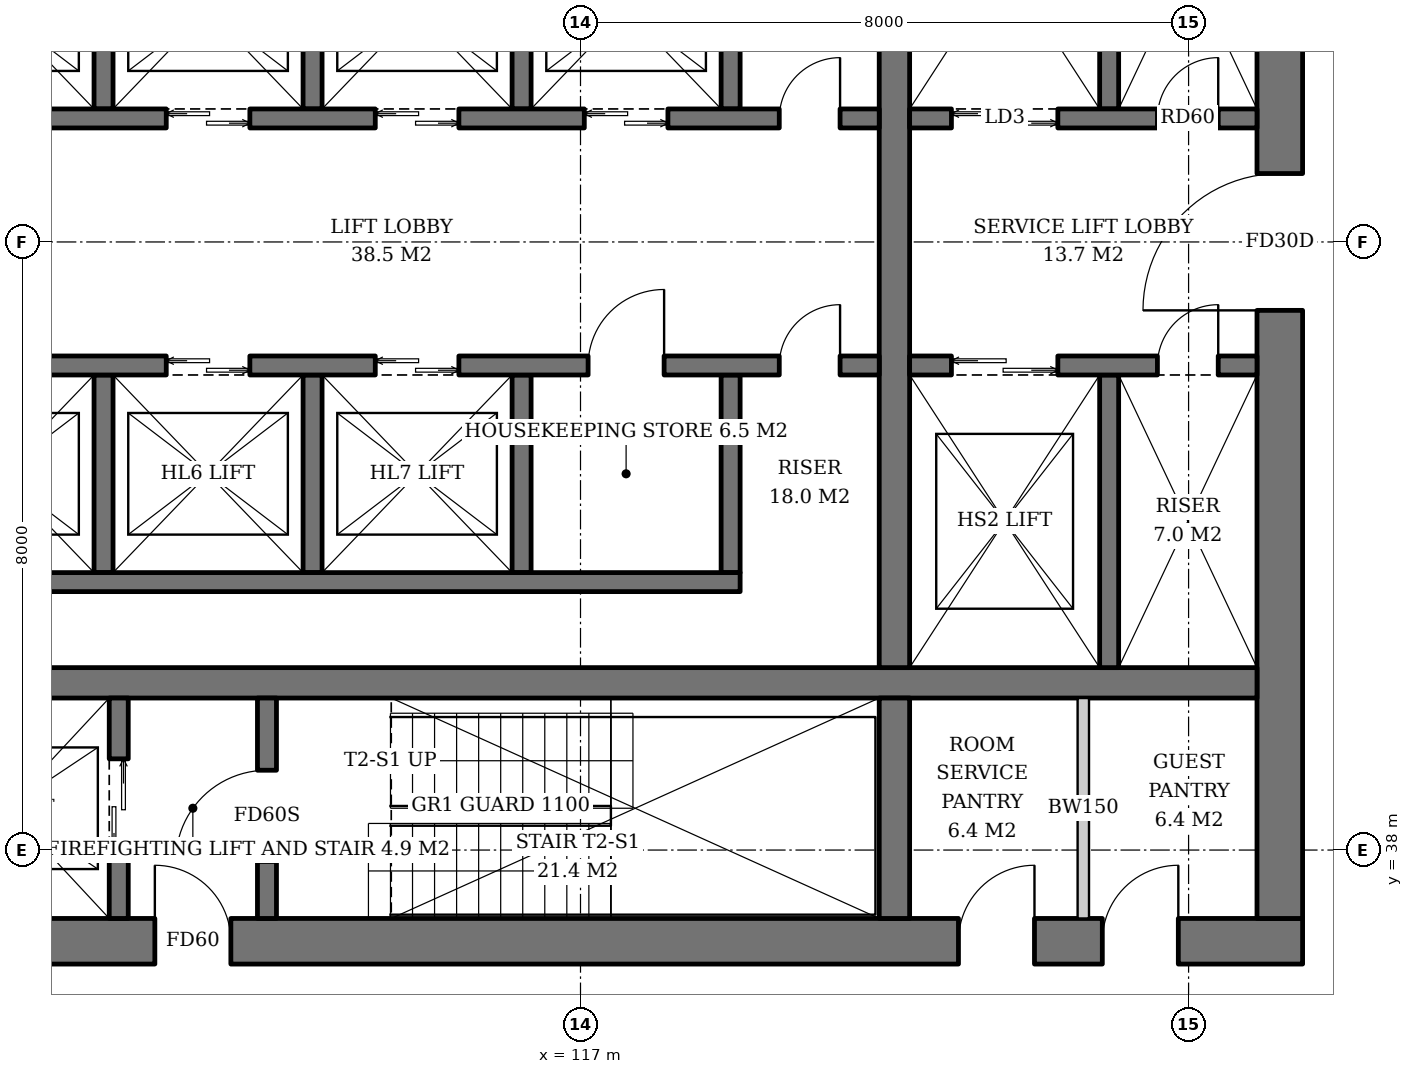
"""IFC4 building model, lengths in metres.
Left out: names, types, materials, properties, quantities, classifications, styles, units other than length and angle.
Written with IfcOpenShell. Run it as: python <this file> out.ifc"""

import sys

from ifc_helpers import new_model, si_unit, direction, frame, frame_2d, origin, place, context, subcontext, project, spatial, rectangle, extrude, element, fill, save


model = new_model("IFC4")
c1 = context("Model", 3, precision=1e-05, world=origin(), true_north=direction((0.0, 1.0)))
c2 = subcontext(c1, "Body", "Model", "MODEL_VIEW")
j1 = project(units=[si_unit("LENGTHUNIT", "METRE"), si_unit("PLANEANGLEUNIT", "RADIAN")], contexts=[c1])
p1 = place(None, origin())
s1 = spatial("IfcSite", under=j1, at=p1, CompositionType="ELEMENT")
p2 = place(p1, origin())
s2 = spatial("IfcBuilding", under=s1, at=p2, CompositionType="ELEMENT")
p3 = place(p2, frame((0.0, 0.0, 89.4)))
s3 = spatial("IfcBuildingStorey", under=s2, at=p3, CompositionType="ELEMENT", Elevation=89.4)
p4 = place(p3, frame((107.5, 36.8, 0.0), z_axis=(0.0, 0.0, 1.0), x_axis=(1.0, 0.0, 0.0)))
e1 = element("IfcWall", 1, at=p4, inside=s3, PredefinedType="SHEAR", context=c2, shape_type="SweptSolid", body=[
    extrude(rectangle(XDim=19.0, YDim=0.6, at=frame_2d((9.5, 0.0))), origin(), (0.0, 0.0, 1.0), 3.8),
])
p5 = place(p4, frame((3.9, 0.0, 0.0)))
e2 = element("IfcOpeningElement", 2, at=p5, cuts=e1, PredefinedType="OPENING", context=c2, shape_type="SweptSolid", body=[
    extrude(rectangle(XDim=1.0, YDim=2.1, at=frame_2d((0.5, 1.05))), frame((0.0, 0.31, 0.0), z_axis=(0.0, -1.0, 0.0), x_axis=(1.0, 0.0, 0.0)), (0.0, 0.0, 1.0), 0.62),
])
p6 = place(p4, frame((14.472, 0.0, 0.0)))
e3 = element("IfcOpeningElement", 3, at=p6, cuts=e1, PredefinedType="OPENING", context=c2, shape_type="SweptSolid", body=[
    extrude(rectangle(XDim=1.0, YDim=2.1, at=frame_2d((0.5, 1.05))), frame((0.0, 0.31, 0.0), z_axis=(0.0, -1.0, 0.0), x_axis=(1.0, 0.0, 0.0)), (0.0, 0.0, 1.0), 0.62),
])
p7 = place(p4, frame((16.365, 0.0, 0.0)))
e4 = element("IfcOpeningElement", 4, at=p7, cuts=e1, PredefinedType="OPENING", context=c2, shape_type="SweptSolid", body=[
    extrude(rectangle(XDim=1.0, YDim=2.1, at=frame_2d((0.5, 1.05))), frame((0.0, 0.31, 0.0), z_axis=(0.0, -1.0, 0.0), x_axis=(1.0, 0.0, 0.0)), (0.0, 0.0, 1.0), 0.62),
])
p8 = place(p3, frame((126.2, 37.1, 0.0), z_axis=(0.0, 0.0, 1.0), x_axis=(0.0, 1.0, 0.0)))
e5 = element("IfcWall", 5, at=p8, inside=s3, PredefinedType="SHEAR", context=c2, shape_type="SweptSolid", body=[
    extrude(rectangle(XDim=17.8, YDim=0.6, at=frame_2d((8.9, 0.0))), origin(), (0.0, 0.0, 1.0), 3.8),
])
p9 = place(p8, frame((8.0, 0.0, 0.0)))
e6 = element("IfcOpeningElement", 6, at=p9, cuts=e5, PredefinedType="OPENING", context=c2, shape_type="SweptSolid", body=[
    extrude(rectangle(XDim=1.8, YDim=2.4, at=frame_2d((0.9, 1.2))), frame((0.0, 0.31, 0.0), z_axis=(0.0, -1.0, 0.0), x_axis=(1.0, 0.0, 0.0)), (0.0, 0.0, 1.0), 0.62),
])
p10 = place(p3, frame((108.1, 40.2, 0.0), z_axis=(0.0, 0.0, 1.0), x_axis=(1.0, 0.0, 0.0)))
e7 = element("IfcWall", 7, at=p10, inside=s3, PredefinedType="SHEAR", context=c2, shape_type="SweptSolid", body=[
    extrude(rectangle(XDim=17.8, YDim=0.4, at=frame_2d((8.9, 0.0))), origin(), (0.0, 0.0, 1.0), 3.8),
])
p11 = place(p3, frame((121.13, 37.1, 0.0), z_axis=(0.0, 0.0, 1.0), x_axis=(0.0, 1.0, 0.0)))
e8 = element("IfcWall", 8, at=p11, inside=s3, PredefinedType="SHEAR", context=c2, shape_type="SweptSolid", body=[
    extrude(rectangle(XDim=2.9, YDim=0.4, at=frame_2d((1.45, 0.0))), origin(), (0.0, 0.0, 1.0), 3.8),
])
p12 = place(p3, frame((121.13, 40.4, 0.0), z_axis=(0.0, 0.0, 1.0), x_axis=(0.0, 1.0, 0.0)))
e9 = element("IfcWall", 9, at=p12, inside=s3, PredefinedType="SHEAR", context=c2, shape_type="SweptSolid", body=[
    extrude(rectangle(XDim=11.2, YDim=0.4, at=frame_2d((5.6, 0.0))), origin(), (0.0, 0.0, 1.0), 3.8),
])
p13 = place(p3, frame((110.925, 37.1, 0.0), z_axis=(0.0, 0.0, 1.0), x_axis=(0.0, 1.0, 0.0)))
e10 = element("IfcWall", 10, at=p13, inside=s3, PredefinedType="SHEAR", context=c2, shape_type="SweptSolid", body=[
    extrude(rectangle(XDim=2.9, YDim=0.25, at=frame_2d((1.45, 0.0))), origin(), (0.0, 0.0, 1.0), 3.8),
])
p14 = place(p13, frame((0.8, 0.0, 0.0)))
e11 = element("IfcOpeningElement", 11, at=p14, cuts=e10, PredefinedType="OPENING", context=c2, shape_type="SweptSolid", body=[
    extrude(rectangle(XDim=1.3, YDim=2.2, at=frame_2d((0.65, 1.1))), frame((0.0, 0.135, 0.0), z_axis=(0.0, -1.0, 0.0), x_axis=(1.0, 0.0, 0.0)), (0.0, 0.0, 1.0), 0.27),
])
p15 = place(p3, frame((112.875, 37.1, 0.0), z_axis=(0.0, 0.0, 1.0), x_axis=(0.0, 1.0, 0.0)))
e12 = element("IfcWall", 12, at=p15, inside=s3, PredefinedType="SHEAR", context=c2, shape_type="SweptSolid", body=[
    extrude(rectangle(XDim=2.9, YDim=0.25, at=frame_2d((1.45, 0.0))), origin(), (0.0, 0.0, 1.0), 3.8),
])
p16 = place(p15, frame((0.75, 0.0, 0.0)))
e13 = element("IfcOpeningElement", 13, at=p16, cuts=e12, PredefinedType="OPENING", context=c2, shape_type="SweptSolid", body=[
    extrude(rectangle(XDim=1.2, YDim=2.1, at=frame_2d((0.6, 1.05))), frame((0.0, 0.135, 0.0), z_axis=(0.0, -1.0, 0.0), x_axis=(1.0, 0.0, 0.0)), (0.0, 0.0, 1.0), 0.27),
])
for number, where, z_axis, x_axis in (
    (14, (110.725, 47.75, 0.0), (0.0, 0.0, 1.0), (0.0, 1.0, 0.0)),
    (15, (113.475, 47.75, 0.0), (0.0, 0.0, 1.0), (0.0, 1.0, 0.0)),
    (16, (116.225, 47.75, 0.0), (0.0, 0.0, 1.0), (0.0, 1.0, 0.0)),
    (17, (118.975, 47.75, 0.0), (0.0, 0.0, 1.0), (0.0, 1.0, 0.0)),
):
    element("IfcWall", number, at=place(p3, frame(where, z_axis=z_axis, x_axis=x_axis)), inside=s3, PredefinedType="SHEAR", context=c2, shape_type="SweptSolid", body=[
        extrude(rectangle(XDim=2.6, YDim=0.25, at=frame_2d((1.3, 0.0))), origin(), (0.0, 0.0, 1.0), 3.8),
    ])
p17 = place(p3, frame((108.1, 47.625, 0.0), z_axis=(0.0, 0.0, 1.0), x_axis=(1.0, 0.0, 0.0)))
e18 = element("IfcWall", 18, at=p17, inside=s3, PredefinedType="SHEAR", context=c2, shape_type="SweptSolid", body=[
    extrude(rectangle(XDim=12.83, YDim=0.25, at=frame_2d((6.415, 0.0))), origin(), (0.0, 0.0, 1.0), 3.8),
])
p18 = place(p17, frame((0.7, 0.0, 0.0)))
e19 = element("IfcOpeningElement", 19, at=p18, cuts=e18, PredefinedType="OPENING", context=c2, shape_type="SweptSolid", body=[
    extrude(rectangle(XDim=1.1, YDim=2.2, at=frame_2d((0.55, 1.1))), frame((0.0, 0.135, 0.0), z_axis=(0.0, -1.0, 0.0), x_axis=(1.0, 0.0, 0.0)), (0.0, 0.0, 1.0), 0.27),
])
p19 = place(p17, frame((3.45, 0.0, 0.0)))
e20 = element("IfcOpeningElement", 20, at=p19, cuts=e18, PredefinedType="OPENING", context=c2, shape_type="SweptSolid", body=[
    extrude(rectangle(XDim=1.1, YDim=2.2, at=frame_2d((0.55, 1.1))), frame((0.0, 0.135, 0.0), z_axis=(0.0, -1.0, 0.0), x_axis=(1.0, 0.0, 0.0)), (0.0, 0.0, 1.0), 0.27),
])
p20 = place(p17, frame((6.2, 0.0, 0.0)))
e21 = element("IfcOpeningElement", 21, at=p20, cuts=e18, PredefinedType="OPENING", context=c2, shape_type="SweptSolid", body=[
    extrude(rectangle(XDim=1.1, YDim=2.2, at=frame_2d((0.55, 1.1))), frame((0.0, 0.135, 0.0), z_axis=(0.0, -1.0, 0.0), x_axis=(1.0, 0.0, 0.0)), (0.0, 0.0, 1.0), 0.27),
])
p21 = place(p17, frame((8.95, 0.0, 0.0)))
e22 = element("IfcOpeningElement", 22, at=p21, cuts=e18, PredefinedType="OPENING", context=c2, shape_type="SweptSolid", body=[
    extrude(rectangle(XDim=1.1, YDim=2.2, at=frame_2d((0.55, 1.1))), frame((0.0, 0.135, 0.0), z_axis=(0.0, -1.0, 0.0), x_axis=(1.0, 0.0, 0.0)), (0.0, 0.0, 1.0), 0.27),
])
p22 = place(p17, frame((11.515, 0.0, 0.0)))
e23 = element("IfcOpeningElement", 23, at=p22, cuts=e18, PredefinedType="OPENING", context=c2, shape_type="SweptSolid", body=[
    extrude(rectangle(XDim=0.8, YDim=2.0, at=frame_2d((0.4, 1.0))), frame((0.0, 0.135, 0.0), z_axis=(0.0, -1.0, 0.0), x_axis=(1.0, 0.0, 0.0)), (0.0, 0.0, 1.0), 0.27),
])
for number, where, z_axis, x_axis in (
    (24, (110.725, 44.25, 0.0), (0.0, 0.0, 1.0), (0.0, -1.0, 0.0)),
    (25, (113.475, 44.25, 0.0), (0.0, 0.0, 1.0), (0.0, -1.0, 0.0)),
    (26, (116.225, 44.25, 0.0), (0.0, 0.0, 1.0), (0.0, -1.0, 0.0)),
    (27, (118.975, 44.25, 0.0), (0.0, 0.0, 1.0), (0.0, -1.0, 0.0)),
):
    element("IfcWall", number, at=place(p3, frame(where, z_axis=z_axis, x_axis=x_axis)), inside=s3, PredefinedType="SHEAR", context=c2, shape_type="SweptSolid", body=[
        extrude(rectangle(XDim=2.6, YDim=0.25, at=frame_2d((1.3, 0.0))), origin(), (0.0, 0.0, 1.0), 3.8),
    ])
p23 = place(p3, frame((108.1, 41.525, 0.0), z_axis=(0.0, 0.0, 1.0), x_axis=(1.0, 0.0, 0.0)))
e28 = element("IfcWall", 28, at=p23, inside=s3, PredefinedType="SHEAR", context=c2, shape_type="SweptSolid", body=[
    extrude(rectangle(XDim=11.0, YDim=0.25, at=frame_2d((5.5, 0.0))), origin(), (0.0, 0.0, 1.0), 3.8),
])
p24 = place(p3, frame((108.1, 44.375, 0.0), z_axis=(0.0, 0.0, 1.0), x_axis=(1.0, 0.0, 0.0)))
e29 = element("IfcWall", 29, at=p24, inside=s3, PredefinedType="SHEAR", context=c2, shape_type="SweptSolid", body=[
    extrude(rectangle(XDim=12.83, YDim=0.25, at=frame_2d((6.415, 0.0))), origin(), (0.0, 0.0, 1.0), 3.8),
])
p25 = place(p24, frame((0.7, 0.0, 0.0)))
e30 = element("IfcOpeningElement", 30, at=p25, cuts=e29, PredefinedType="OPENING", context=c2, shape_type="SweptSolid", body=[
    extrude(rectangle(XDim=1.1, YDim=2.2, at=frame_2d((0.55, 1.1))), frame((0.0, 0.135, 0.0), z_axis=(0.0, -1.0, 0.0), x_axis=(1.0, 0.0, 0.0)), (0.0, 0.0, 1.0), 0.27),
])
p26 = place(p24, frame((3.45, 0.0, 0.0)))
e31 = element("IfcOpeningElement", 31, at=p26, cuts=e29, PredefinedType="OPENING", context=c2, shape_type="SweptSolid", body=[
    extrude(rectangle(XDim=1.1, YDim=2.2, at=frame_2d((0.55, 1.1))), frame((0.0, 0.135, 0.0), z_axis=(0.0, -1.0, 0.0), x_axis=(1.0, 0.0, 0.0)), (0.0, 0.0, 1.0), 0.27),
])
p27 = place(p24, frame((6.2, 0.0, 0.0)))
e32 = element("IfcOpeningElement", 32, at=p27, cuts=e29, PredefinedType="OPENING", context=c2, shape_type="SweptSolid", body=[
    extrude(rectangle(XDim=1.1, YDim=2.2, at=frame_2d((0.55, 1.1))), frame((0.0, 0.135, 0.0), z_axis=(0.0, -1.0, 0.0), x_axis=(1.0, 0.0, 0.0)), (0.0, 0.0, 1.0), 0.27),
])
p28 = place(p24, frame((9.0, 0.0, 0.0)))
e33 = element("IfcOpeningElement", 33, at=p28, cuts=e29, PredefinedType="OPENING", context=c2, shape_type="SweptSolid", body=[
    extrude(rectangle(XDim=1.0, YDim=2.1, at=frame_2d((0.5, 1.05))), frame((0.0, 0.135, 0.0), z_axis=(0.0, -1.0, 0.0), x_axis=(1.0, 0.0, 0.0)), (0.0, 0.0, 1.0), 0.27),
])
p29 = place(p24, frame((11.515, 0.0, 0.0)))
e34 = element("IfcOpeningElement", 34, at=p29, cuts=e29, PredefinedType="OPENING", context=c2, shape_type="SweptSolid", body=[
    extrude(rectangle(XDim=0.8, YDim=2.0, at=frame_2d((0.4, 1.0))), frame((0.0, 0.135, 0.0), z_axis=(0.0, -1.0, 0.0), x_axis=(1.0, 0.0, 0.0)), (0.0, 0.0, 1.0), 0.27),
])
p30 = place(p3, frame((123.955, 47.75, 0.0), z_axis=(0.0, 0.0, 1.0), x_axis=(0.0, 1.0, 0.0)))
e35 = element("IfcWall", 35, at=p30, inside=s3, PredefinedType="SHEAR", context=c2, shape_type="SweptSolid", body=[
    extrude(rectangle(XDim=3.85, YDim=0.25, at=frame_2d((1.925, 0.0))), origin(), (0.0, 0.0, 1.0), 3.8),
])
p31 = place(p3, frame((121.33, 47.625, 0.0), z_axis=(0.0, 0.0, 1.0), x_axis=(1.0, 0.0, 0.0)))
e36 = element("IfcWall", 36, at=p31, inside=s3, PredefinedType="SHEAR", context=c2, shape_type="SweptSolid", body=[
    extrude(rectangle(XDim=4.57, YDim=0.25, at=frame_2d((2.285, 0.0))), origin(), (0.0, 0.0, 1.0), 3.8),
])
p32 = place(p31, frame((0.55, 0.0, 0.0)))
e37 = element("IfcOpeningElement", 37, at=p32, cuts=e36, PredefinedType="OPENING", context=c2, shape_type="SweptSolid", body=[
    extrude(rectangle(XDim=1.4, YDim=2.4, at=frame_2d((0.7, 1.2))), frame((0.0, 0.135, 0.0), z_axis=(0.0, -1.0, 0.0), x_axis=(1.0, 0.0, 0.0)), (0.0, 0.0, 1.0), 0.27),
])
p33 = place(p31, frame((3.26, 0.0, 0.0)))
e38 = element("IfcOpeningElement", 38, at=p33, cuts=e36, PredefinedType="OPENING", context=c2, shape_type="SweptSolid", body=[
    extrude(rectangle(XDim=0.8, YDim=2.0, at=frame_2d((0.4, 1.0))), frame((0.0, 0.135, 0.0), z_axis=(0.0, -1.0, 0.0), x_axis=(1.0, 0.0, 0.0)), (0.0, 0.0, 1.0), 0.27),
])
p34 = place(p3, frame((123.955, 44.25, 0.0), z_axis=(0.0, 0.0, 1.0), x_axis=(0.0, -1.0, 0.0)))
e39 = element("IfcWall", 39, at=p34, inside=s3, PredefinedType="SHEAR", context=c2, shape_type="SweptSolid", body=[
    extrude(rectangle(XDim=3.85, YDim=0.25, at=frame_2d((1.925, 0.0))), origin(), (0.0, 0.0, 1.0), 3.8),
])
p35 = place(p3, frame((121.33, 44.375, 0.0), z_axis=(0.0, 0.0, 1.0), x_axis=(1.0, 0.0, 0.0)))
e40 = element("IfcWall", 40, at=p35, inside=s3, PredefinedType="SHEAR", context=c2, shape_type="SweptSolid", body=[
    extrude(rectangle(XDim=4.57, YDim=0.25, at=frame_2d((2.285, 0.0))), origin(), (0.0, 0.0, 1.0), 3.8),
])
p36 = place(p35, frame((0.55, 0.0, 0.0)))
e41 = element("IfcOpeningElement", 41, at=p36, cuts=e40, PredefinedType="OPENING", context=c2, shape_type="SweptSolid", body=[
    extrude(rectangle(XDim=1.4, YDim=2.4, at=frame_2d((0.7, 1.2))), frame((0.0, 0.135, 0.0), z_axis=(0.0, -1.0, 0.0), x_axis=(1.0, 0.0, 0.0)), (0.0, 0.0, 1.0), 0.27),
])
p37 = place(p35, frame((3.26, 0.0, 0.0)))
e42 = element("IfcOpeningElement", 42, at=p37, cuts=e40, PredefinedType="OPENING", context=c2, shape_type="SweptSolid", body=[
    extrude(rectangle(XDim=0.8, YDim=2.0, at=frame_2d((0.4, 1.0))), frame((0.0, 0.135, 0.0), z_axis=(0.0, -1.0, 0.0), x_axis=(1.0, 0.0, 0.0)), (0.0, 0.0, 1.0), 0.27),
])
p38 = place(p3, frame((123.615, 37.1, 0.0), z_axis=(0.0, 0.0, 1.0), x_axis=(0.0, 1.0, 0.0)))
e43 = element("IfcWall", 43, at=p38, inside=s3, PredefinedType="SOLIDWALL", context=c2, shape_type="SweptSolid", body=[
    extrude(rectangle(XDim=2.9, YDim=0.15, at=frame_2d((1.45, 0.0))), origin(), (0.0, 0.0, 1.0), 3.6),
])
p39 = place(p14, origin())
e44 = element("IfcDoor", 44, at=p39, inside=s3, OperationType="DOUBLE_DOOR_SLIDING", PredefinedType="DOOR", context=c2, shape_type="SweptSolid", body=[
    extrude(rectangle(XDim=1.3, YDim=2.2, at=frame_2d((0.65, 1.1))), frame((0.0, 0.025, 0.0), z_axis=(0.0, -1.0, 0.0), x_axis=(1.0, 0.0, 0.0)), (0.0, 0.0, 1.0), 0.05),
])
fill(e11, e44)
p40 = place(p16, origin())
e45 = element("IfcDoor", 45, at=p40, inside=s3, OperationType="SINGLE_SWING_LEFT", PredefinedType="DOOR", context=c2, shape_type="SweptSolid", body=[
    extrude(rectangle(XDim=1.2, YDim=2.1, at=frame_2d((0.6, 1.05))), frame((0.0, 0.025, 0.0), z_axis=(0.0, -1.0, 0.0), x_axis=(1.0, 0.0, 0.0)), (0.0, 0.0, 1.0), 0.05),
])
fill(e13, e45)
p41 = place(p19, origin())
e46 = element("IfcDoor", 46, at=p41, inside=s3, OperationType="DOUBLE_DOOR_SLIDING", PredefinedType="DOOR", context=c2, shape_type="SweptSolid", body=[
    extrude(rectangle(XDim=1.1, YDim=2.2, at=frame_2d((0.55, 1.1))), frame((0.0, 0.025, 0.0), z_axis=(0.0, -1.0, 0.0), x_axis=(1.0, 0.0, 0.0)), (0.0, 0.0, 1.0), 0.05),
])
fill(e20, e46)
p42 = place(p20, origin())
e47 = element("IfcDoor", 47, at=p42, inside=s3, OperationType="DOUBLE_DOOR_SLIDING", PredefinedType="DOOR", context=c2, shape_type="SweptSolid", body=[
    extrude(rectangle(XDim=1.1, YDim=2.2, at=frame_2d((0.55, 1.1))), frame((0.0, 0.025, 0.0), z_axis=(0.0, -1.0, 0.0), x_axis=(1.0, 0.0, 0.0)), (0.0, 0.0, 1.0), 0.05),
])
fill(e21, e47)
p43 = place(p21, origin())
e48 = element("IfcDoor", 48, at=p43, inside=s3, OperationType="DOUBLE_DOOR_SLIDING", PredefinedType="DOOR", context=c2, shape_type="SweptSolid", body=[
    extrude(rectangle(XDim=1.1, YDim=2.2, at=frame_2d((0.55, 1.1))), frame((0.0, 0.025, 0.0), z_axis=(0.0, -1.0, 0.0), x_axis=(1.0, 0.0, 0.0)), (0.0, 0.0, 1.0), 0.05),
])
fill(e22, e48)
p44 = place(p22, origin())
e49 = element("IfcDoor", 49, at=p44, inside=s3, OperationType="SINGLE_SWING_RIGHT", PredefinedType="DOOR", context=c2, shape_type="SweptSolid", body=[
    extrude(rectangle(XDim=0.8, YDim=2.0, at=frame_2d((0.4, 1.0))), frame((0.0, 0.025, 0.0), z_axis=(0.0, -1.0, 0.0), x_axis=(1.0, 0.0, 0.0)), (0.0, 0.0, 1.0), 0.05),
])
fill(e23, e49)
p45 = place(p26, origin())
e50 = element("IfcDoor", 50, at=p45, inside=s3, OperationType="DOUBLE_DOOR_SLIDING", PredefinedType="DOOR", context=c2, shape_type="SweptSolid", body=[
    extrude(rectangle(XDim=1.1, YDim=2.2, at=frame_2d((0.55, 1.1))), frame((0.0, 0.025, 0.0), z_axis=(0.0, -1.0, 0.0), x_axis=(1.0, 0.0, 0.0)), (0.0, 0.0, 1.0), 0.05),
])
fill(e31, e50)
p46 = place(p27, origin())
e51 = element("IfcDoor", 51, at=p46, inside=s3, OperationType="DOUBLE_DOOR_SLIDING", PredefinedType="DOOR", context=c2, shape_type="SweptSolid", body=[
    extrude(rectangle(XDim=1.1, YDim=2.2, at=frame_2d((0.55, 1.1))), frame((0.0, 0.025, 0.0), z_axis=(0.0, -1.0, 0.0), x_axis=(1.0, 0.0, 0.0)), (0.0, 0.0, 1.0), 0.05),
])
fill(e32, e51)
p47 = place(p28, origin())
e52 = element("IfcDoor", 52, at=p47, inside=s3, OperationType="SINGLE_SWING_RIGHT", PredefinedType="DOOR", context=c2, shape_type="SweptSolid", body=[
    extrude(rectangle(XDim=1.0, YDim=2.1, at=frame_2d((0.5, 1.05))), frame((0.0, 0.025, 0.0), z_axis=(0.0, -1.0, 0.0), x_axis=(1.0, 0.0, 0.0)), (0.0, 0.0, 1.0), 0.05),
])
fill(e33, e52)
p48 = place(p29, origin())
e53 = element("IfcDoor", 53, at=p48, inside=s3, OperationType="SINGLE_SWING_RIGHT", PredefinedType="DOOR", context=c2, shape_type="SweptSolid", body=[
    extrude(rectangle(XDim=0.8, YDim=2.0, at=frame_2d((0.4, 1.0))), frame((0.0, 0.025, 0.0), z_axis=(0.0, -1.0, 0.0), x_axis=(1.0, 0.0, 0.0)), (0.0, 0.0, 1.0), 0.05),
])
fill(e34, e53)
p49 = place(p32, origin())
e54 = element("IfcDoor", 54, at=p49, inside=s3, OperationType="DOUBLE_DOOR_SLIDING", PredefinedType="DOOR", context=c2, shape_type="SweptSolid", body=[
    extrude(rectangle(XDim=1.4, YDim=2.4, at=frame_2d((0.7, 1.2))), frame((0.0, 0.025, 0.0), z_axis=(0.0, -1.0, 0.0), x_axis=(1.0, 0.0, 0.0)), (0.0, 0.0, 1.0), 0.05),
])
fill(e37, e54)
p50 = place(p33, origin())
e55 = element("IfcDoor", 55, at=p50, inside=s3, OperationType="SINGLE_SWING_RIGHT", PredefinedType="DOOR", context=c2, shape_type="SweptSolid", body=[
    extrude(rectangle(XDim=0.8, YDim=2.0, at=frame_2d((0.4, 1.0))), frame((0.0, 0.025, 0.0), z_axis=(0.0, -1.0, 0.0), x_axis=(1.0, 0.0, 0.0)), (0.0, 0.0, 1.0), 0.05),
])
fill(e38, e55)
p51 = place(p36, origin())
e56 = element("IfcDoor", 56, at=p51, inside=s3, OperationType="DOUBLE_DOOR_SLIDING", PredefinedType="DOOR", context=c2, shape_type="SweptSolid", body=[
    extrude(rectangle(XDim=1.4, YDim=2.4, at=frame_2d((0.7, 1.2))), frame((0.0, 0.025, 0.0), z_axis=(0.0, -1.0, 0.0), x_axis=(1.0, 0.0, 0.0)), (0.0, 0.0, 1.0), 0.05),
])
fill(e41, e56)
p52 = place(p37, origin())
e57 = element("IfcDoor", 57, at=p52, inside=s3, OperationType="SINGLE_SWING_RIGHT", PredefinedType="DOOR", context=c2, shape_type="SweptSolid", body=[
    extrude(rectangle(XDim=0.8, YDim=2.0, at=frame_2d((0.4, 1.0))), frame((0.0, 0.025, 0.0), z_axis=(0.0, -1.0, 0.0), x_axis=(1.0, 0.0, 0.0)), (0.0, 0.0, 1.0), 0.05),
])
fill(e42, e57)
p53 = place(p5, origin())
e58 = element("IfcDoor", 58, at=p53, inside=s3, OperationType="SINGLE_SWING_LEFT", PredefinedType="DOOR", context=c2, shape_type="SweptSolid", body=[
    extrude(rectangle(XDim=1.0, YDim=2.1, at=frame_2d((0.5, 1.05))), frame((0.0, 0.025, 0.0), z_axis=(0.0, -1.0, 0.0), x_axis=(1.0, 0.0, 0.0)), (0.0, 0.0, 1.0), 0.05),
])
fill(e2, e58)
p54 = place(p9, origin())
e59 = element("IfcDoor", 59, at=p54, inside=s3, OperationType="DOUBLE_DOOR_SINGLE_SWING", PredefinedType="DOOR", context=c2, shape_type="SweptSolid", body=[
    extrude(rectangle(XDim=1.8, YDim=2.4, at=frame_2d((0.9, 1.2))), frame((0.0, 0.025, 0.0), z_axis=(0.0, -1.0, 0.0), x_axis=(1.0, 0.0, 0.0)), (0.0, 0.0, 1.0), 0.05),
])
fill(e6, e59)
p55 = place(p6, origin())
e60 = element("IfcDoor", 60, at=p55, inside=s3, OperationType="SINGLE_SWING_RIGHT", PredefinedType="DOOR", context=c2, shape_type="SweptSolid", body=[
    extrude(rectangle(XDim=1.0, YDim=2.1, at=frame_2d((0.5, 1.05))), frame((0.0, 0.29, 0.0), z_axis=(0.0, -1.0, 0.0), x_axis=(1.0, 0.0, 0.0)), (0.0, 0.0, 1.0), 0.05),
])
fill(e3, e60)
p56 = place(p7, origin())
e61 = element("IfcDoor", 61, at=p56, inside=s3, OperationType="SINGLE_SWING_RIGHT", PredefinedType="DOOR", context=c2, shape_type="SweptSolid", body=[
    extrude(rectangle(XDim=1.0, YDim=2.1, at=frame_2d((0.5, 1.05))), frame((0.0, 0.29, 0.0), z_axis=(0.0, -1.0, 0.0), x_axis=(1.0, 0.0, 0.0)), (0.0, 0.0, 1.0), 0.05),
])
fill(e4, e61)
save(model, sys.argv[1])
